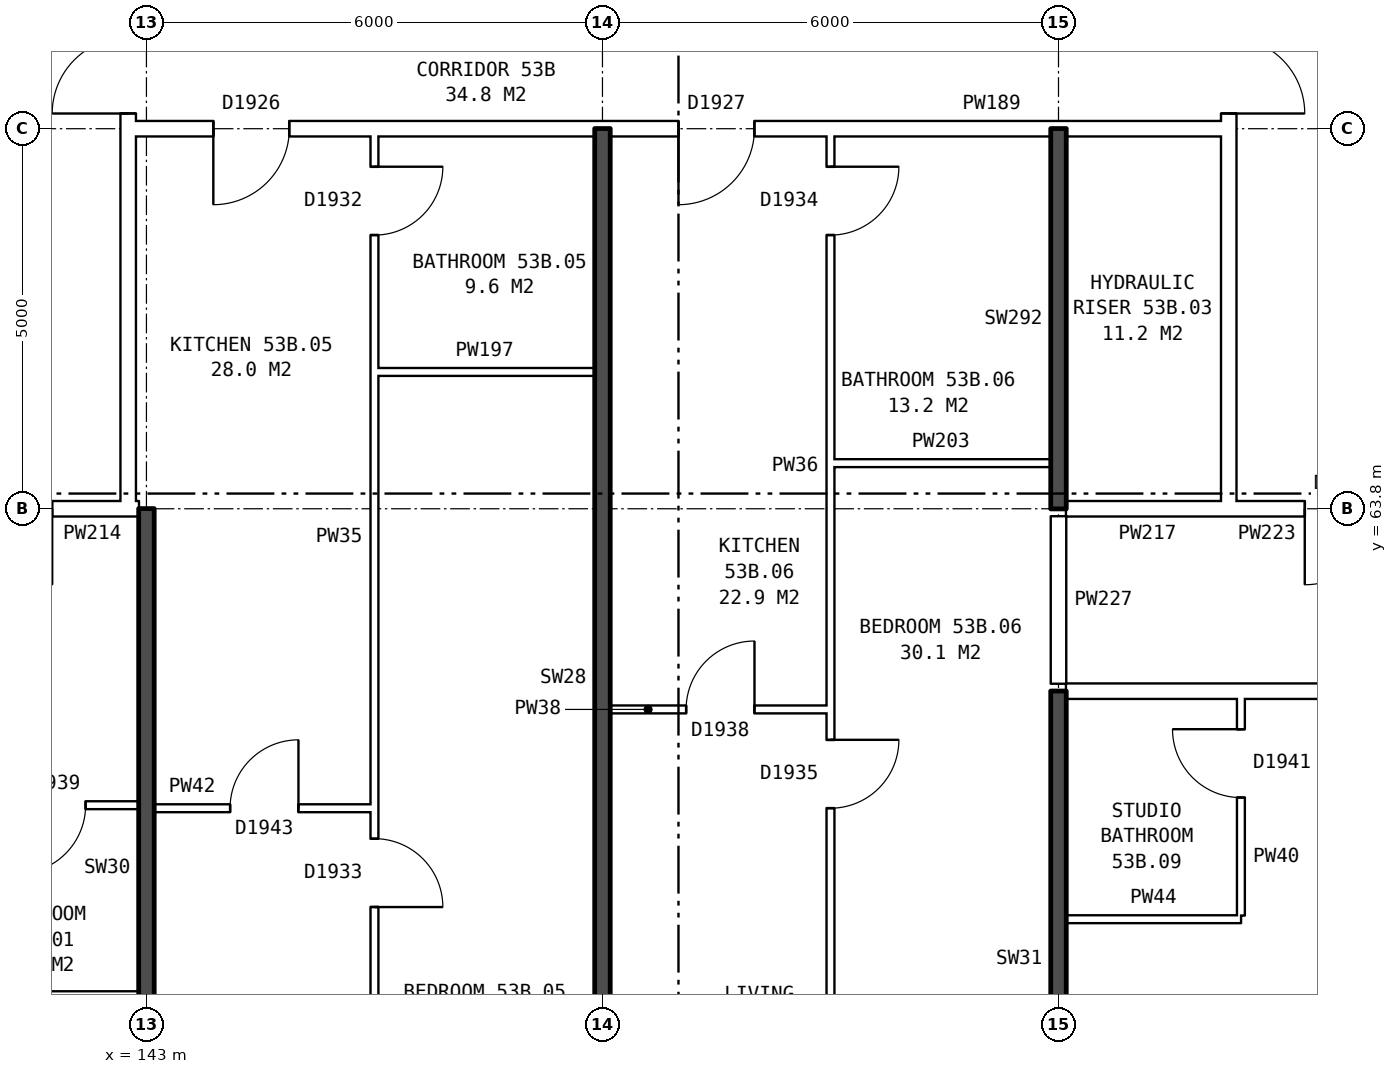
"""IFC4 building model, lengths in metres.
Left out: names, types, materials, properties, quantities, classifications, styles, units other than length and angle.
Written with IfcOpenShell. Run it as: python <this file> out.ifc"""

import sys

from ifc_helpers import new_model, si_unit, direction, frame, frame_2d, origin, place, context, subcontext, project, spatial, rectangle, extrude, element, fill, save


model = new_model("IFC4")
c1 = context("Model", 3, precision=1e-05, world=origin(), true_north=direction((0.0, 1.0)))
c2 = subcontext(c1, "Body", "Model", "MODEL_VIEW")
j1 = project(units=[si_unit("LENGTHUNIT", "METRE"), si_unit("PLANEANGLEUNIT", "RADIAN")], contexts=[c1])
p1 = place(None, origin())
s1 = spatial("IfcSite", under=j1, at=p1, CompositionType="ELEMENT")
p2 = place(p1, origin())
s2 = spatial("IfcBuilding", under=s1, at=p2, CompositionType="ELEMENT")
p3 = place(p2, frame((0.0, 0.0, 188.2)))
s3 = spatial("IfcBuildingStorey", under=s2, at=p3, CompositionType="ELEMENT", Elevation=188.2)
p4 = place(p3, frame((142.76, 63.9, 0.0), z_axis=(0.0, 0.0, 1.0), x_axis=(0.0, 1.0, 0.0)))
e1 = element("IfcWall", 1, at=p4, inside=s3, PredefinedType="PARTITIONING", context=c2, shape_type="SweptSolid", body=[
    extrude(rectangle(XDim=12.2, YDim=0.2, at=frame_2d((6.1, 0.0))), origin(), (0.0, 0.0, 1.0), 2.85),
])
p5 = place(p4, frame((5.1, 0.0, 0.0)))
e2 = element("IfcOpeningElement", 2, at=p5, cuts=e1, PredefinedType="OPENING", context=c2, shape_type="SweptSolid", body=[
    extrude(rectangle(XDim=2.0, YDim=2.1, at=frame_2d((1.0, 1.05))), frame((0.0, 0.11, 0.0), z_axis=(0.0, -1.0, 0.0), x_axis=(1.0, 0.0, 0.0)), (0.0, 0.0, 1.0), 0.22),
])
p6 = place(p3, frame((157.24, 63.9, 0.0), z_axis=(0.0, 0.0, 1.0), x_axis=(0.0, 1.0, 0.0)))
e3 = element("IfcWall", 3, at=p6, inside=s3, PredefinedType="PARTITIONING", context=c2, shape_type="SweptSolid", body=[
    extrude(rectangle(XDim=12.2, YDim=0.2, at=frame_2d((6.1, 0.0))), origin(), (0.0, 0.0, 1.0), 2.85),
])
p7 = place(p6, frame((5.1, 0.0, 0.0)))
e4 = element("IfcOpeningElement", 4, at=p7, cuts=e3, PredefinedType="OPENING", context=c2, shape_type="SweptSolid", body=[
    extrude(rectangle(XDim=2.0, YDim=2.1, at=frame_2d((1.0, 1.05))), frame((0.0, 0.11, 0.0), z_axis=(0.0, -1.0, 0.0), x_axis=(1.0, 0.0, 0.0)), (0.0, 0.0, 1.0), 0.22),
])
for number, where, z_axis, x_axis in (
    (5, (140.6, 57.4, 0.0), (0.0, 0.0, 1.0), (1.0, 0.0, 0.0)),
    (6, (155.1, 58.4, 0.0), (0.0, 0.0, 1.0), (1.0, 0.0, 0.0)),
):
    element("IfcWall", number, at=place(p3, frame(where, z_axis=z_axis, x_axis=x_axis)), inside=s3, PredefinedType="PARTITIONING", context=c2, shape_type="SweptSolid", body=[
        extrude(rectangle(XDim=2.3, YDim=0.1, at=frame_2d((1.15, 0.0))), origin(), (0.0, 0.0, 1.0), 2.85),
    ])
p8 = place(p3, frame((143.1, 59.86, 0.0), z_axis=(0.0, 0.0, 1.0), x_axis=(1.0, 0.0, 0.0)))
e7 = element("IfcWall", 7, at=p8, inside=s3, PredefinedType="PARTITIONING", context=c2, shape_type="SweptSolid", body=[
    extrude(rectangle(XDim=2.9, YDim=0.1, at=frame_2d((1.45, 0.0))), origin(), (0.0, 0.0, 1.0), 2.85),
])
p9 = place(p8, frame((1.0, 0.0, 0.0)))
e8 = element("IfcOpeningElement", 8, at=p9, cuts=e7, PredefinedType="OPENING", context=c2, shape_type="SweptSolid", body=[
    extrude(rectangle(XDim=0.9, YDim=2.1, at=frame_2d((0.45, 1.05))), frame((0.0, 0.06, 0.0), z_axis=(0.0, -1.0, 0.0), x_axis=(1.0, 0.0, 0.0)), (0.0, 0.0, 1.0), 0.12),
])
p10 = place(p3, frame((137.1, 59.9, 0.0), z_axis=(0.0, 0.0, 1.0), x_axis=(1.0, 0.0, 0.0)))
e9 = element("IfcWall", 9, at=p10, inside=s3, PredefinedType="PARTITIONING", context=c2, shape_type="SweptSolid", body=[
    extrude(rectangle(XDim=5.8, YDim=0.1, at=frame_2d((2.9, 0.0))), origin(), (0.0, 0.0, 1.0), 2.85),
])
p11 = place(p10, frame((1.3, 0.0, 0.0)))
e10 = element("IfcOpeningElement", 10, at=p11, cuts=e9, PredefinedType="OPENING", context=c2, shape_type="SweptSolid", body=[
    extrude(rectangle(XDim=0.9, YDim=2.1, at=frame_2d((0.45, 1.05))), frame((0.0, 0.06, 0.0), z_axis=(0.0, -1.0, 0.0), x_axis=(1.0, 0.0, 0.0)), (0.0, 0.0, 1.0), 0.12),
])
p12 = place(p10, frame((4.2, 0.0, 0.0)))
e11 = element("IfcOpeningElement", 11, at=p12, cuts=e9, PredefinedType="OPENING", context=c2, shape_type="SweptSolid", body=[
    extrude(rectangle(XDim=0.9, YDim=2.1, at=frame_2d((0.45, 1.05))), frame((0.0, 0.06, 0.0), z_axis=(0.0, -1.0, 0.0), x_axis=(1.0, 0.0, 0.0)), (0.0, 0.0, 1.0), 0.12),
])
p13 = place(p3, frame((149.1, 61.16, 0.0), z_axis=(0.0, 0.0, 1.0), x_axis=(1.0, 0.0, 0.0)))
e12 = element("IfcWall", 12, at=p13, inside=s3, PredefinedType="PARTITIONING", context=c2, shape_type="SweptSolid", body=[
    extrude(rectangle(XDim=2.9, YDim=0.1, at=frame_2d((1.45, 0.0))), origin(), (0.0, 0.0, 1.0), 2.85),
])
p14 = place(p13, frame((1.0, 0.0, 0.0)))
e13 = element("IfcOpeningElement", 13, at=p14, cuts=e12, PredefinedType="OPENING", context=c2, shape_type="SweptSolid", body=[
    extrude(rectangle(XDim=0.9, YDim=2.1, at=frame_2d((0.45, 1.05))), frame((0.0, 0.06, 0.0), z_axis=(0.0, -1.0, 0.0), x_axis=(1.0, 0.0, 0.0)), (0.0, 0.0, 1.0), 0.12),
])
p15 = place(p3, frame((155.1, 61.4, 0.0), z_axis=(0.0, 0.0, 1.0), x_axis=(1.0, 0.0, 0.0)))
e14 = element("IfcWall", 14, at=p15, inside=s3, PredefinedType="PARTITIONING", context=c2, shape_type="SweptSolid", body=[
    extrude(rectangle(XDim=14.79, YDim=0.2, at=frame_2d((7.395, 0.0))), origin(), (0.0, 0.0, 1.0), 2.85),
])
p16 = place(p15, frame((3.6, 0.0, 0.0)))
e15 = element("IfcOpeningElement", 15, at=p16, cuts=e14, PredefinedType="OPENING", context=c2, shape_type="SweptSolid", body=[
    extrude(rectangle(XDim=1.0, YDim=2.1, at=frame_2d((0.5, 1.05))), frame((0.0, 0.11, 0.0), z_axis=(0.0, -1.0, 0.0), x_axis=(1.0, 0.0, 0.0)), (0.0, 0.0, 1.0), 0.22),
])
p17 = place(p15, frame((11.045, 0.0, 0.0)))
e16 = element("IfcOpeningElement", 16, at=p17, cuts=e14, PredefinedType="OPENING", context=c2, shape_type="SweptSolid", body=[
    extrude(rectangle(XDim=1.0, YDim=2.1, at=frame_2d((0.5, 1.05))), frame((0.0, 0.11, 0.0), z_axis=(0.0, -1.0, 0.0), x_axis=(1.0, 0.0, 0.0)), (0.0, 0.0, 1.0), 0.22),
])
p18 = place(p3, frame((139.76, 63.8, 0.0), z_axis=(0.0, 0.0, 1.0), x_axis=(1.0, 0.0, 0.0)))
e17 = element("IfcWall", 17, at=p18, inside=s3, PredefinedType="PARTITIONING", context=c2, shape_type="SweptSolid", body=[
    extrude(rectangle(XDim=3.0, YDim=0.2, at=frame_2d((1.5, 0.0))), origin(), (0.0, 0.0, 1.0), 2.85),
])
p19 = place(p18, frame((1.0, 0.0, 0.0)))
e18 = element("IfcOpeningElement", 18, at=p19, cuts=e17, PredefinedType="OPENING", context=c2, shape_type="SweptSolid", body=[
    extrude(rectangle(XDim=1.0, YDim=2.1, at=frame_2d((0.5, 1.05))), frame((0.0, 0.11, 0.0), z_axis=(0.0, -1.0, 0.0), x_axis=(1.0, 0.0, 0.0)), (0.0, 0.0, 1.0), 0.22),
])
p20 = place(p3, frame((142.76, 63.8, 0.0), z_axis=(0.0, 0.0, 1.0), x_axis=(1.0, 0.0, 0.0)))
e19 = element("IfcWall", 19, at=p20, inside=s3, PredefinedType="PARTITIONING", context=c2, shape_type="SweptSolid", body=[
    extrude(rectangle(XDim=0.14, YDim=0.2, at=frame_2d((0.07, 0.0))), origin(), (0.0, 0.0, 1.0), 2.85),
])
p21 = place(p3, frame((155.1, 63.8, 0.0), z_axis=(0.0, 0.0, 1.0), x_axis=(1.0, 0.0, 0.0)))
e20 = element("IfcWall", 20, at=p21, inside=s3, PredefinedType="PARTITIONING", context=c2, shape_type="SweptSolid", body=[
    extrude(rectangle(XDim=2.14, YDim=0.2, at=frame_2d((1.07, 0.0))), origin(), (0.0, 0.0, 1.0), 2.85),
])
p22 = place(p3, frame((157.24, 63.8, 0.0), z_axis=(0.0, 0.0, 1.0), x_axis=(1.0, 0.0, 0.0)))
e21 = element("IfcWall", 21, at=p22, inside=s3, PredefinedType="PARTITIONING", context=c2, shape_type="SweptSolid", body=[
    extrude(rectangle(XDim=3.0, YDim=0.2, at=frame_2d((1.5, 0.0))), origin(), (0.0, 0.0, 1.0), 2.85),
])
p23 = place(p22, frame((1.0, 0.0, 0.0)))
e22 = element("IfcOpeningElement", 22, at=p23, cuts=e21, PredefinedType="OPENING", context=c2, shape_type="SweptSolid", body=[
    extrude(rectangle(XDim=1.0, YDim=2.1, at=frame_2d((0.5, 1.05))), frame((0.0, 0.11, 0.0), z_axis=(0.0, -1.0, 0.0), x_axis=(1.0, 0.0, 0.0)), (0.0, 0.0, 1.0), 0.22),
])
for number, where, z_axis, x_axis in (
    (23, (152.0, 64.4, 0.0), (0.0, 0.0, 1.0), (1.0, 0.0, 0.0)),
    (24, (146.0, 65.6, 0.0), (0.0, 0.0, 1.0), (1.0, 0.0, 0.0)),
):
    element("IfcWall", number, at=place(p3, frame(where, z_axis=z_axis, x_axis=x_axis)), inside=s3, PredefinedType="PARTITIONING", context=c2, shape_type="SweptSolid", body=[
        extrude(rectangle(XDim=2.9, YDim=0.1, at=frame_2d((1.45, 0.0))), origin(), (0.0, 0.0, 1.0), 2.85),
    ])
p24 = place(p3, frame((142.76, 68.8, 0.0), z_axis=(0.0, 0.0, 1.0), x_axis=(1.0, 0.0, 0.0)))
e25 = element("IfcWall", 25, at=p24, inside=s3, PredefinedType="PARTITIONING", context=c2, shape_type="SweptSolid", body=[
    extrude(rectangle(XDim=14.48, YDim=0.2, at=frame_2d((7.24, 0.0))), origin(), (0.0, 0.0, 1.0), 2.85),
])
p25 = place(p24, frame((1.12, 0.0, 0.0)))
e26 = element("IfcOpeningElement", 26, at=p25, cuts=e25, PredefinedType="OPENING", context=c2, shape_type="SweptSolid", body=[
    extrude(rectangle(XDim=1.0, YDim=2.1, at=frame_2d((0.5, 1.05))), frame((0.0, 0.11, 0.0), z_axis=(0.0, -1.0, 0.0), x_axis=(1.0, 0.0, 0.0)), (0.0, 0.0, 1.0), 0.22),
])
p26 = place(p24, frame((7.24, 0.0, 0.0)))
e27 = element("IfcOpeningElement", 27, at=p26, cuts=e25, PredefinedType="OPENING", context=c2, shape_type="SweptSolid", body=[
    extrude(rectangle(XDim=1.0, YDim=2.1, at=frame_2d((0.5, 1.05))), frame((0.0, 0.11, 0.0), z_axis=(0.0, -1.0, 0.0), x_axis=(1.0, 0.0, 0.0)), (0.0, 0.0, 1.0), 0.22),
])
p27 = place(p3, frame((143.0, 54.36, 0.0), z_axis=(0.0, 0.0, 1.0), x_axis=(0.0, 1.0, 0.0)))
e28 = element("IfcWall", 28, at=p27, inside=s3, PredefinedType="SOLIDWALL", context=c2, shape_type="SweptSolid", body=[
    extrude(rectangle(XDim=9.44, YDim=0.2, at=frame_2d((4.72, 0.0))), origin(), (0.0, 0.0, 1.0), 2.85),
])
p28 = place(p3, frame((146.0, 54.36, 0.0), z_axis=(0.0, 0.0, 1.0), x_axis=(0.0, 1.0, 0.0)))
e29 = element("IfcWall", 29, at=p28, inside=s3, PredefinedType="PARTITIONING", context=c2, shape_type="SweptSolid", body=[
    extrude(rectangle(XDim=14.34, YDim=0.1, at=frame_2d((7.17, 0.0))), origin(), (0.0, 0.0, 1.0), 2.85),
])
p29 = place(p28, frame((4.2, 0.0, 0.0)))
e30 = element("IfcOpeningElement", 30, at=p29, cuts=e29, PredefinedType="OPENING", context=c2, shape_type="SweptSolid", body=[
    extrude(rectangle(XDim=0.9, YDim=2.1, at=frame_2d((0.45, 1.05))), frame((0.0, 0.06, 0.0), z_axis=(0.0, -1.0, 0.0), x_axis=(1.0, 0.0, 0.0)), (0.0, 0.0, 1.0), 0.12),
])
p30 = place(p28, frame((13.04, 0.0, 0.0)))
e31 = element("IfcOpeningElement", 31, at=p30, cuts=e29, PredefinedType="OPENING", context=c2, shape_type="SweptSolid", body=[
    extrude(rectangle(XDim=0.9, YDim=2.1, at=frame_2d((0.45, 1.05))), frame((0.0, 0.06, 0.0), z_axis=(0.0, -1.0, 0.0), x_axis=(1.0, 0.0, 0.0)), (0.0, 0.0, 1.0), 0.12),
])
p31 = place(p3, frame((149.0, 54.36, 0.0), z_axis=(0.0, 0.0, 1.0), x_axis=(0.0, 1.0, 0.0)))
e32 = element("IfcWall", 32, at=p31, inside=s3, PredefinedType="SOLIDWALL", context=c2, shape_type="SweptSolid", body=[
    extrude(rectangle(XDim=14.44, YDim=0.2, at=frame_2d((7.22, 0.0))), origin(), (0.0, 0.0, 1.0), 2.85),
])
p32 = place(p3, frame((152.0, 54.36, 0.0), z_axis=(0.0, 0.0, 1.0), x_axis=(0.0, 1.0, 0.0)))
e33 = element("IfcWall", 33, at=p32, inside=s3, PredefinedType="PARTITIONING", context=c2, shape_type="SweptSolid", body=[
    extrude(rectangle(XDim=14.34, YDim=0.1, at=frame_2d((7.17, 0.0))), origin(), (0.0, 0.0, 1.0), 2.85),
])
p33 = place(p32, frame((5.5, 0.0, 0.0)))
e34 = element("IfcOpeningElement", 34, at=p33, cuts=e33, PredefinedType="OPENING", context=c2, shape_type="SweptSolid", body=[
    extrude(rectangle(XDim=0.9, YDim=2.1, at=frame_2d((0.45, 1.05))), frame((0.0, 0.06, 0.0), z_axis=(0.0, -1.0, 0.0), x_axis=(1.0, 0.0, 0.0)), (0.0, 0.0, 1.0), 0.12),
])
p34 = place(p32, frame((13.04, 0.0, 0.0)))
e35 = element("IfcOpeningElement", 35, at=p34, cuts=e33, PredefinedType="OPENING", context=c2, shape_type="SweptSolid", body=[
    extrude(rectangle(XDim=0.9, YDim=2.1, at=frame_2d((0.45, 1.05))), frame((0.0, 0.06, 0.0), z_axis=(0.0, -1.0, 0.0), x_axis=(1.0, 0.0, 0.0)), (0.0, 0.0, 1.0), 0.12),
])
p35 = place(p3, frame((155.0, 54.36, 0.0), z_axis=(0.0, 0.0, 1.0), x_axis=(0.0, 1.0, 0.0)))
e36 = element("IfcWall", 36, at=p35, inside=s3, PredefinedType="SOLIDWALL", context=c2, shape_type="SweptSolid", body=[
    extrude(rectangle(XDim=7.04, YDim=0.2, at=frame_2d((3.52, 0.0))), origin(), (0.0, 0.0, 1.0), 2.85),
])
p36 = place(p3, frame((155.0, 61.5, 0.0), z_axis=(0.0, 0.0, 1.0), x_axis=(0.0, 1.0, 0.0)))
e37 = element("IfcWall", 37, at=p36, inside=s3, PredefinedType="PARTITIONING", context=c2, shape_type="SweptSolid", body=[
    extrude(rectangle(XDim=2.2, YDim=0.2, at=frame_2d((1.1, 0.0))), origin(), (0.0, 0.0, 1.0), 2.85),
])
p37 = place(p3, frame((155.0, 63.8, 0.0), z_axis=(0.0, 0.0, 1.0), x_axis=(0.0, 1.0, 0.0)))
e38 = element("IfcWall", 38, at=p37, inside=s3, PredefinedType="SOLIDWALL", context=c2, shape_type="SweptSolid", body=[
    extrude(rectangle(XDim=5.0, YDim=0.2, at=frame_2d((2.5, 0.0))), origin(), (0.0, 0.0, 1.0), 2.85),
])
p38 = place(p3, frame((157.4, 58.45, 0.0), z_axis=(0.0, 0.0, 1.0), x_axis=(0.0, 1.0, 0.0)))
e39 = element("IfcWall", 39, at=p38, inside=s3, PredefinedType="PARTITIONING", context=c2, shape_type="SweptSolid", body=[
    extrude(rectangle(XDim=2.85, YDim=0.1, at=frame_2d((1.425, 0.0))), origin(), (0.0, 0.0, 1.0), 2.85),
])
p39 = place(p38, frame((1.55, 0.0, 0.0)))
e40 = element("IfcOpeningElement", 40, at=p39, cuts=e39, PredefinedType="OPENING", context=c2, shape_type="SweptSolid", body=[
    extrude(rectangle(XDim=0.9, YDim=2.1, at=frame_2d((0.45, 1.05))), frame((0.0, 0.06, 0.0), z_axis=(0.0, -1.0, 0.0), x_axis=(1.0, 0.0, 0.0)), (0.0, 0.0, 1.0), 0.12),
])
p40 = place(p5, origin())
e41 = element("IfcDoor", 41, at=p40, inside=s3, OperationType="DOUBLE_DOOR_SINGLE_SWING", PredefinedType="DOOR", context=c2, shape_type="SweptSolid", body=[
    extrude(rectangle(XDim=2.0, YDim=2.1, at=frame_2d((1.0, 1.05))), frame((0.0, 0.025, 0.0), z_axis=(0.0, -1.0, 0.0), x_axis=(1.0, 0.0, 0.0)), (0.0, 0.0, 1.0), 0.05),
])
fill(e2, e41)
p41 = place(p7, frame((2.0, 0.0, 0.0), z_axis=(0.0, 0.0, 1.0), x_axis=(-1.0, 0.0, 0.0)))
e42 = element("IfcDoor", 42, at=p41, inside=s3, OperationType="DOUBLE_DOOR_SINGLE_SWING", PredefinedType="DOOR", context=c2, shape_type="SweptSolid", body=[
    extrude(rectangle(XDim=2.0, YDim=2.1, at=frame_2d((1.0, 1.05))), frame((0.0, 0.025, 0.0), z_axis=(0.0, -1.0, 0.0), x_axis=(1.0, 0.0, 0.0)), (0.0, 0.0, 1.0), 0.05),
])
fill(e4, e42)
p42 = place(p23, frame((1.0, 0.0, 0.0), z_axis=(0.0, 0.0, 1.0), x_axis=(-1.0, 0.0, 0.0)))
e43 = element("IfcDoor", 43, at=p42, inside=s3, OperationType="SINGLE_SWING_RIGHT", PredefinedType="DOOR", context=c2, shape_type="SweptSolid", body=[
    extrude(rectangle(XDim=1.0, YDim=2.1, at=frame_2d((0.5, 1.05))), frame((0.0, 0.025, 0.0), z_axis=(0.0, -1.0, 0.0), x_axis=(1.0, 0.0, 0.0)), (0.0, 0.0, 1.0), 0.05),
])
fill(e22, e43)
p43 = place(p12, frame((0.9, 0.0, 0.0), z_axis=(0.0, 0.0, 1.0), x_axis=(-1.0, 0.0, 0.0)))
e44 = element("IfcDoor", 44, at=p43, inside=s3, OperationType="SINGLE_SWING_RIGHT", PredefinedType="DOOR", context=c2, shape_type="SweptSolid", body=[
    extrude(rectangle(XDim=0.9, YDim=2.1, at=frame_2d((0.45, 1.05))), frame((0.0, 0.025, 0.0), z_axis=(0.0, -1.0, 0.0), x_axis=(1.0, 0.0, 0.0)), (0.0, 0.0, 1.0), 0.05),
])
fill(e11, e44)
p44 = place(p29, frame((0.9, 0.0, 0.0), z_axis=(0.0, 0.0, 1.0), x_axis=(-1.0, 0.0, 0.0)))
e45 = element("IfcDoor", 45, at=p44, inside=s3, OperationType="SINGLE_SWING_RIGHT", PredefinedType="DOOR", context=c2, shape_type="SweptSolid", body=[
    extrude(rectangle(XDim=0.9, YDim=2.1, at=frame_2d((0.45, 1.05))), frame((0.0, 0.025, 0.0), z_axis=(0.0, -1.0, 0.0), x_axis=(1.0, 0.0, 0.0)), (0.0, 0.0, 1.0), 0.05),
])
fill(e30, e45)
p45 = place(p25, frame((1.0, 0.0, 0.0), z_axis=(0.0, 0.0, 1.0), x_axis=(-1.0, 0.0, 0.0)))
e46 = element("IfcDoor", 46, at=p45, inside=s3, OperationType="SINGLE_SWING_RIGHT", PredefinedType="DOOR", context=c2, shape_type="SweptSolid", body=[
    extrude(rectangle(XDim=1.0, YDim=2.1, at=frame_2d((0.5, 1.05))), frame((0.0, 0.025, 0.0), z_axis=(0.0, -1.0, 0.0), x_axis=(1.0, 0.0, 0.0)), (0.0, 0.0, 1.0), 0.05),
])
fill(e26, e46)
p46 = place(p9, origin())
e47 = element("IfcDoor", 47, at=p46, inside=s3, OperationType="SINGLE_SWING_RIGHT", PredefinedType="DOOR", context=c2, shape_type="SweptSolid", body=[
    extrude(rectangle(XDim=0.9, YDim=2.1, at=frame_2d((0.45, 1.05))), frame((0.0, 0.025, 0.0), z_axis=(0.0, -1.0, 0.0), x_axis=(1.0, 0.0, 0.0)), (0.0, 0.0, 1.0), 0.05),
])
fill(e8, e47)
p47 = place(p30, frame((0.9, 0.0, 0.0), z_axis=(0.0, 0.0, 1.0), x_axis=(-1.0, 0.0, 0.0)))
e48 = element("IfcDoor", 48, at=p47, inside=s3, OperationType="SINGLE_SWING_LEFT", PredefinedType="DOOR", context=c2, shape_type="SweptSolid", body=[
    extrude(rectangle(XDim=0.9, YDim=2.1, at=frame_2d((0.45, 1.05))), frame((0.0, 0.025, 0.0), z_axis=(0.0, -1.0, 0.0), x_axis=(1.0, 0.0, 0.0)), (0.0, 0.0, 1.0), 0.05),
])
fill(e31, e48)
p48 = place(p33, frame((0.9, 0.0, 0.0), z_axis=(0.0, 0.0, 1.0), x_axis=(-1.0, 0.0, 0.0)))
e49 = element("IfcDoor", 49, at=p48, inside=s3, OperationType="SINGLE_SWING_LEFT", PredefinedType="DOOR", context=c2, shape_type="SweptSolid", body=[
    extrude(rectangle(XDim=0.9, YDim=2.1, at=frame_2d((0.45, 1.05))), frame((0.0, 0.025, 0.0), z_axis=(0.0, -1.0, 0.0), x_axis=(1.0, 0.0, 0.0)), (0.0, 0.0, 1.0), 0.05),
])
fill(e34, e49)
p49 = place(p26, frame((1.0, 0.0, 0.0), z_axis=(0.0, 0.0, 1.0), x_axis=(-1.0, 0.0, 0.0)))
e50 = element("IfcDoor", 50, at=p49, inside=s3, OperationType="SINGLE_SWING_RIGHT", PredefinedType="DOOR", context=c2, shape_type="SweptSolid", body=[
    extrude(rectangle(XDim=1.0, YDim=2.1, at=frame_2d((0.5, 1.05))), frame((0.0, 0.025, 0.0), z_axis=(0.0, -1.0, 0.0), x_axis=(1.0, 0.0, 0.0)), (0.0, 0.0, 1.0), 0.05),
])
fill(e27, e50)
p50 = place(p14, origin())
e51 = element("IfcDoor", 51, at=p50, inside=s3, OperationType="SINGLE_SWING_RIGHT", PredefinedType="DOOR", context=c2, shape_type="SweptSolid", body=[
    extrude(rectangle(XDim=0.9, YDim=2.1, at=frame_2d((0.45, 1.05))), frame((0.0, 0.025, 0.0), z_axis=(0.0, -1.0, 0.0), x_axis=(1.0, 0.0, 0.0)), (0.0, 0.0, 1.0), 0.05),
])
fill(e13, e51)
p51 = place(p34, frame((0.9, 0.0, 0.0), z_axis=(0.0, 0.0, 1.0), x_axis=(-1.0, 0.0, 0.0)))
e52 = element("IfcDoor", 52, at=p51, inside=s3, OperationType="SINGLE_SWING_LEFT", PredefinedType="DOOR", context=c2, shape_type="SweptSolid", body=[
    extrude(rectangle(XDim=0.9, YDim=2.1, at=frame_2d((0.45, 1.05))), frame((0.0, 0.025, 0.0), z_axis=(0.0, -1.0, 0.0), x_axis=(1.0, 0.0, 0.0)), (0.0, 0.0, 1.0), 0.05),
])
fill(e35, e52)
p52 = place(p39, origin())
e53 = element("IfcDoor", 53, at=p52, inside=s3, OperationType="SINGLE_SWING_RIGHT", PredefinedType="DOOR", context=c2, shape_type="SweptSolid", body=[
    extrude(rectangle(XDim=0.9, YDim=2.1, at=frame_2d((0.45, 1.05))), frame((0.0, 0.025, 0.0), z_axis=(0.0, -1.0, 0.0), x_axis=(1.0, 0.0, 0.0)), (0.0, 0.0, 1.0), 0.05),
])
fill(e40, e53)
save(model, sys.argv[1])
